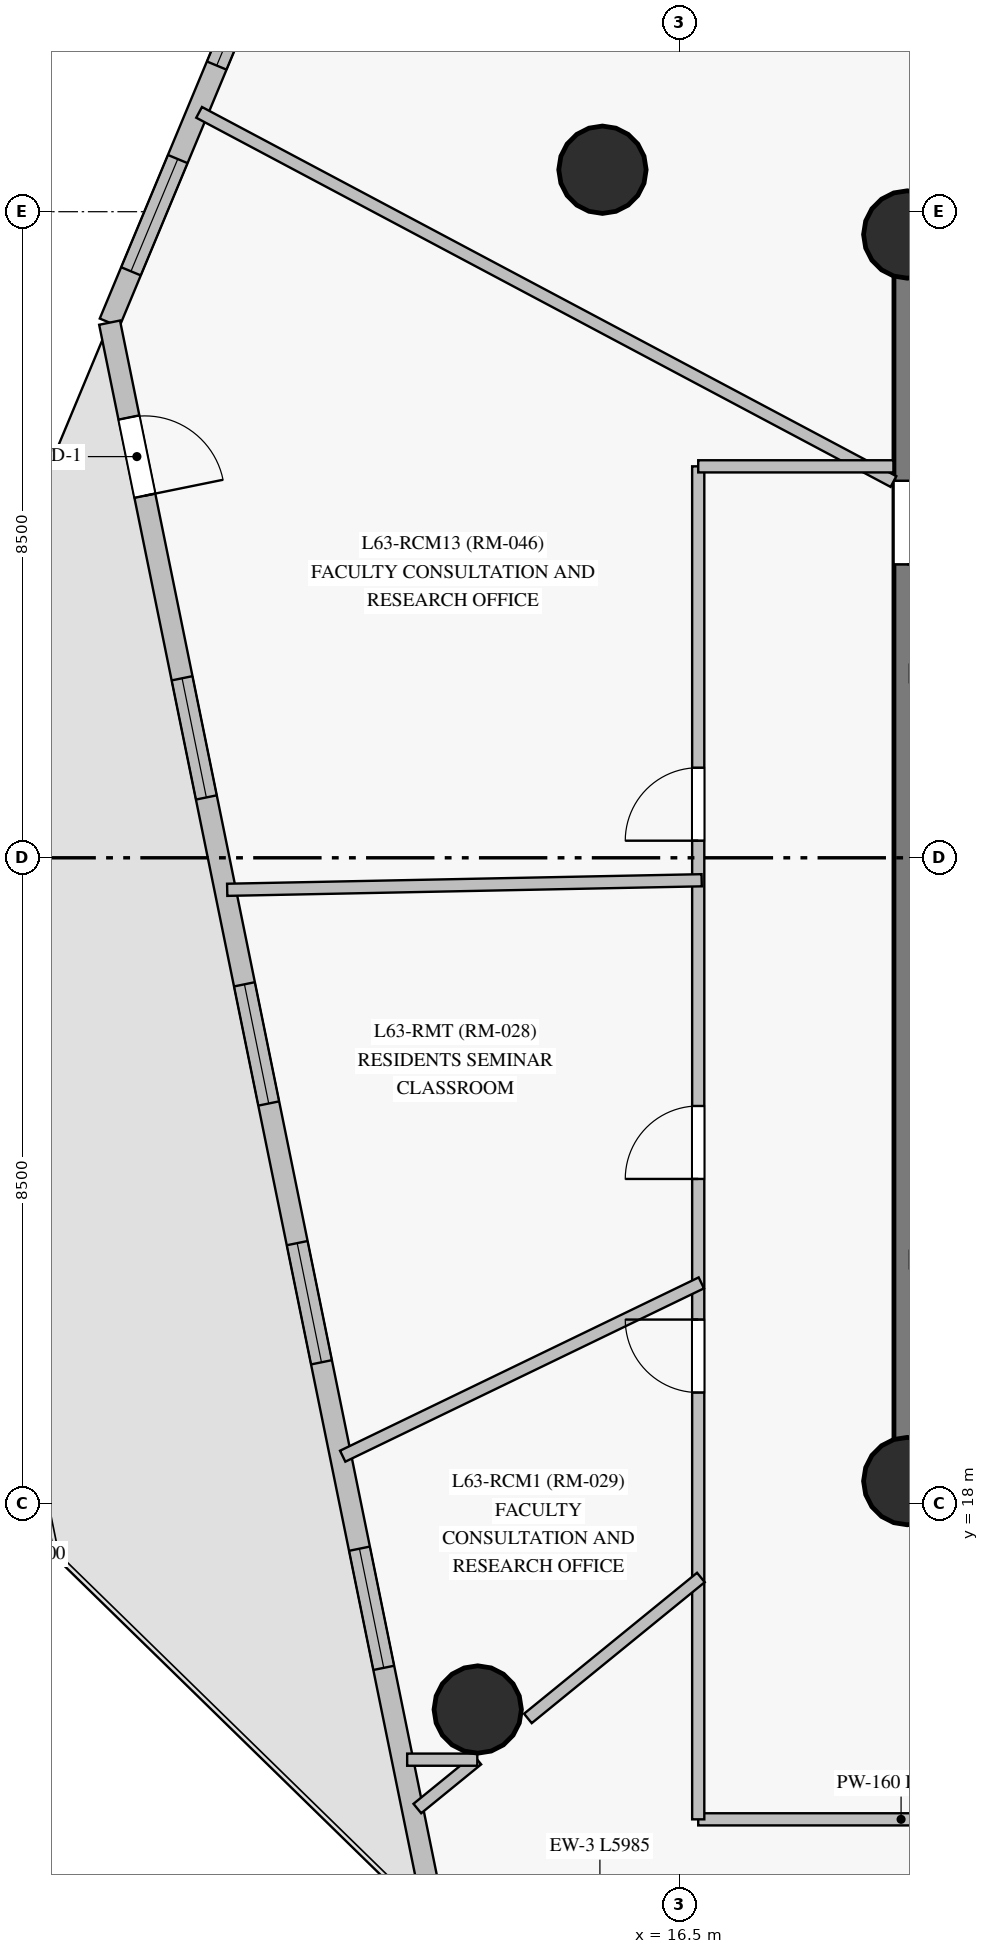
"""IFC4 building model, lengths in metres.
Left out: names, types, materials, properties, quantities, classifications, styles, units other than length and angle.
Written with IfcOpenShell. Run it as: python <this file> out.ifc"""

import sys

from ifc_helpers import new_model, si_unit, direction, frame, frame_2d, origin, origin_with_axes, origin_2d, place, context, subcontext, project, spatial, rectangle, circle, extrude, source, transform, mapped, element, fill, save


model = new_model("IFC4")
c1 = context("Model", 3, precision=1e-05, world=origin(), true_north=direction((0.0, 1.0)))
c2 = subcontext(c1, "Body", "Model", "MODEL_VIEW")
j1 = project(units=[si_unit("LENGTHUNIT", "METRE"), si_unit("PLANEANGLEUNIT", "RADIAN")], contexts=[c1])
p1 = place(None, origin())
s1 = spatial("IfcSite", under=j1, at=p1, CompositionType="ELEMENT")
p2 = place(p1, origin())
s2 = spatial("IfcBuilding", under=s1, at=p2, CompositionType="ELEMENT")
p3 = place(p2, frame((0.0, 0.0, 216.9)))
s3 = spatial("IfcBuildingStorey", under=s2, at=p3, CompositionType="ELEMENT", Elevation=216.9)
p4 = place(p3, frame((19.5, 18.3, 0.0), z_axis=(0.0, 0.0, 1.0), x_axis=(1.0, 0.0, 0.0)))
e1 = element("IfcWall", 1, at=p4, inside=s3, PredefinedType="SHEAR", context=c2, shape_type="SweptSolid", body=[
    extrude(rectangle(XDim=7.05, YDim=0.35, at=frame_2d((3.525, 0.0))), origin(), (0.0, 0.0, 1.0), 2.85),
])
p5 = place(p4, frame((4.2, 0.0, 0.0)))
e2 = element("IfcOpeningElement", 2, at=p5, cuts=e1, PredefinedType="OPENING", context=c2, shape_type="SweptSolid", body=[
    extrude(rectangle(XDim=1.4, YDim=2.2, at=frame_2d((0.7, 1.1))), frame((0.0, 0.185, 0.0), z_axis=(0.0, -1.0, 0.0), x_axis=(1.0, 0.0, 0.0)), (0.0, 0.0, 1.0), 0.37),
])
p6 = place(p3, frame((26.55, 34.7, 0.0), z_axis=(0.0, 0.0, 1.0), x_axis=(-1.0, 0.0, 0.0)))
e3 = element("IfcWall", 3, at=p6, inside=s3, PredefinedType="SHEAR", context=c2, shape_type="SweptSolid", body=[
    extrude(rectangle(XDim=7.05, YDim=0.35, at=frame_2d((3.525, 0.0))), origin(), (0.0, 0.0, 1.0), 2.85),
])
p7 = place(p3, frame((19.5, 34.7, 0.0), z_axis=(0.0, 0.0, 1.0), x_axis=(0.0, -1.0, 0.0)))
e4 = element("IfcWall", 4, at=p7, inside=s3, PredefinedType="SHEAR", context=c2, shape_type="SweptSolid", body=[
    extrude(rectangle(XDim=16.4, YDim=0.35, at=frame_2d((8.2, 0.0))), origin(), (0.0, 0.0, 1.0), 2.85),
])
p8 = place(p7, frame((3.24, 0.0, 0.0)))
e5 = element("IfcOpeningElement", 5, at=p8, cuts=e4, PredefinedType="OPENING", context=c2, shape_type="SweptSolid", body=[
    extrude(rectangle(XDim=1.1, YDim=2.15, at=frame_2d((0.55, 1.075))), frame((0.0, 0.185, 0.0), z_axis=(0.0, -1.0, 0.0), x_axis=(1.0, 0.0, 0.0)), (0.0, 0.0, 1.0), 0.37),
])
m1 = source(origin_with_axes(), c2, "Body", "SweptSolid", [
    extrude(circle(Radius=0.575, at=origin_2d()), origin(), (0.0, 0.0, 1.0), 3.05),
])
for number, where, z_axis, x_axis in (
    (6, (19.5, 18.3, 0.0), (0.0, 0.0, 1.0), (1.0, 0.0, 0.0)),
    (7, (19.5, 34.7, 0.0), (0.0, 0.0, 1.0), (1.0, 0.0, 0.0)),
    (8, (15.49, 35.552, 0.0), (0.0, 0.0, 1.0), (1.0, 0.0, 0.0)),
    (9, (13.849, 15.295, 0.0), (0.0, 0.0, 1.0), (1.0, 0.0, 0.0)),
):
    element("IfcColumn", number, at=place(p3, frame(where, z_axis=z_axis, x_axis=x_axis)), inside=s3, PredefinedType="COLUMN", context=c2, shape_type="MappedRepresentation", body=[
        mapped(m1, transform((0.0, 0.0, 0.0), scale=1.0)),
    ])
p9 = place(p3, frame((11.308, 39.065, 0.0), z_axis=(0.0, 0.0, 1.0), x_axis=(-0.384644347337, -0.923064854743, 0.0)))
e10 = element("IfcWall", 10, at=p9, inside=s3, PredefinedType="SOLIDWALL", context=c2, shape_type="SweptSolid", body=[
    extrude(rectangle(XDim=5.985, YDim=0.28, at=frame_2d((2.993, 0.0))), origin(), (0.0, 0.0, 1.0), 2.85),
])
p10 = place(p9, frame((0.721, 0.0, 0.85)))
e11 = element("IfcOpeningElement", 11, at=p10, cuts=e10, PredefinedType="OPENING", context=c2, shape_type="SweptSolid", body=[
    extrude(rectangle(XDim=1.6, YDim=1.6, at=frame_2d((0.8, 0.8))), frame((0.0, 0.15, 0.0), z_axis=(0.0, -1.0, 0.0), x_axis=(1.0, 0.0, 0.0)), (0.0, 0.0, 1.0), 0.3),
])
p11 = place(p9, frame((3.654, 0.0, 0.85)))
e12 = element("IfcOpeningElement", 12, at=p11, cuts=e10, PredefinedType="OPENING", context=c2, shape_type="SweptSolid", body=[
    extrude(rectangle(XDim=1.6, YDim=1.6, at=frame_2d((0.8, 0.8))), frame((0.0, 0.15, 0.0), z_axis=(0.0, -1.0, 0.0), x_axis=(1.0, 0.0, 0.0)), (0.0, 0.0, 1.0), 0.3),
])
p12 = place(p3, frame((9.006, 33.54, 0.0), z_axis=(0.0, 0.0, 1.0), x_axis=(0.19971489877, -0.979854049953, 0.0)))
e13 = element("IfcWall", 13, at=p12, inside=s3, PredefinedType="SOLIDWALL", context=c2, shape_type="SweptSolid", body=[
    extrude(rectangle(XDim=21.583, YDim=0.28, at=frame_2d((10.792, 0.0))), origin(), (0.0, 0.0, 1.0), 2.85),
])
p13 = place(p12, frame((4.775, 0.0, 0.85)))
e14 = element("IfcOpeningElement", 14, at=p13, cuts=e13, PredefinedType="OPENING", context=c2, shape_type="SweptSolid", body=[
    extrude(rectangle(XDim=1.6, YDim=1.6, at=frame_2d((0.8, 0.8))), frame((0.0, 0.15, 0.0), z_axis=(0.0, -1.0, 0.0), x_axis=(1.0, 0.0, 0.0)), (0.0, 0.0, 1.0), 0.3),
])
p14 = place(p12, frame((8.884, 0.0, 0.85)))
e15 = element("IfcOpeningElement", 15, at=p14, cuts=e13, PredefinedType="OPENING", context=c2, shape_type="SweptSolid", body=[
    extrude(rectangle(XDim=1.6, YDim=1.6, at=frame_2d((0.8, 0.8))), frame((0.0, 0.15, 0.0), z_axis=(0.0, -1.0, 0.0), x_axis=(1.0, 0.0, 0.0)), (0.0, 0.0, 1.0), 0.3),
])
p15 = place(p12, frame((12.359, 0.0, 0.85)))
e16 = element("IfcOpeningElement", 16, at=p15, cuts=e13, PredefinedType="OPENING", context=c2, shape_type="SweptSolid", body=[
    extrude(rectangle(XDim=1.6, YDim=1.6, at=frame_2d((0.8, 0.8))), frame((0.0, 0.15, 0.0), z_axis=(0.0, -1.0, 0.0), x_axis=(1.0, 0.0, 0.0)), (0.0, 0.0, 1.0), 0.3),
])
p16 = place(p12, frame((16.461, 0.0, 0.85)))
e17 = element("IfcOpeningElement", 17, at=p16, cuts=e13, PredefinedType="OPENING", context=c2, shape_type="SweptSolid", body=[
    extrude(rectangle(XDim=1.6, YDim=1.6, at=frame_2d((0.8, 0.8))), frame((0.0, 0.15, 0.0), z_axis=(0.0, -1.0, 0.0), x_axis=(1.0, 0.0, 0.0)), (0.0, 0.0, 1.0), 0.3),
])
p17 = place(p12, frame((1.274, 0.0, 0.0)))
e18 = element("IfcOpeningElement", 18, at=p17, cuts=e13, PredefinedType="OPENING", context=c2, shape_type="SweptSolid", body=[
    extrude(rectangle(XDim=1.05, YDim=2.12, at=frame_2d((0.525, 1.06))), frame((0.0, 0.15, 0.0), z_axis=(0.0, -1.0, 0.0), x_axis=(1.0, 0.0, 0.0)), (0.0, 0.0, 1.0), 0.3),
])
p18 = place(p3, frame((41.8, 13.85, 0.0), z_axis=(0.0, 0.0, 1.0), x_axis=(-1.0, 0.0, 0.0)))
e19 = element("IfcWall", 19, at=p18, inside=s3, PredefinedType="PARTITIONING", context=c2, shape_type="SweptSolid", body=[
    extrude(rectangle(XDim=25.05, YDim=0.16, at=frame_2d((12.525, 0.0))), origin(), (0.0, 0.0, 1.0), 2.3),
])
p19 = place(p18, frame((10.634, 0.0, 0.0)))
e20 = element("IfcOpeningElement", 20, at=p19, cuts=e19, PredefinedType="OPENING", context=c2, shape_type="SweptSolid", body=[
    extrude(rectangle(XDim=0.96, YDim=2.15, at=frame_2d((0.48, 1.075))), frame((0.0, 0.09, 0.0), z_axis=(0.0, -1.0, 0.0), x_axis=(1.0, 0.0, 0.0)), (0.0, 0.0, 1.0), 0.18),
])
p20 = place(p18, frame((6.48, 0.0, 0.0)))
e21 = element("IfcOpeningElement", 21, at=p20, cuts=e19, PredefinedType="OPENING", context=c2, shape_type="SweptSolid", body=[
    extrude(rectangle(XDim=0.96, YDim=2.15, at=frame_2d((0.48, 1.075))), frame((0.0, 0.09, 0.0), z_axis=(0.0, -1.0, 0.0), x_axis=(1.0, 0.0, 0.0)), (0.0, 0.0, 1.0), 0.18),
])
p21 = place(p18, frame((18.752, 0.0, 0.0)))
e22 = element("IfcOpeningElement", 22, at=p21, cuts=e19, PredefinedType="OPENING", context=c2, shape_type="SweptSolid", body=[
    extrude(rectangle(XDim=0.96, YDim=2.15, at=frame_2d((0.48, 1.075))), frame((0.0, 0.09, 0.0), z_axis=(0.0, -1.0, 0.0), x_axis=(1.0, 0.0, 0.0)), (0.0, 0.0, 1.0), 0.18),
])
p22 = place(p18, frame((15.808, 0.0, 0.0)))
e23 = element("IfcOpeningElement", 23, at=p22, cuts=e19, PredefinedType="OPENING", context=c2, shape_type="SweptSolid", body=[
    extrude(rectangle(XDim=0.96, YDim=2.15, at=frame_2d((0.48, 1.075))), frame((0.0, 0.09, 0.0), z_axis=(0.0, -1.0, 0.0), x_axis=(1.0, 0.0, 0.0)), (0.0, 0.0, 1.0), 0.18),
])
p23 = place(p18, frame((13.594, 0.0, 0.0)))
e24 = element("IfcOpeningElement", 24, at=p23, cuts=e19, PredefinedType="OPENING", context=c2, shape_type="SweptSolid", body=[
    extrude(rectangle(XDim=0.96, YDim=2.15, at=frame_2d((0.48, 1.075))), frame((0.0, 0.09, 0.0), z_axis=(0.0, -1.0, 0.0), x_axis=(1.0, 0.0, 0.0)), (0.0, 0.0, 1.0), 0.18),
])
p24 = place(p18, frame((1.822, 0.0, 0.0)))
e25 = element("IfcOpeningElement", 25, at=p24, cuts=e19, PredefinedType="OPENING", context=c2, shape_type="SweptSolid", body=[
    extrude(rectangle(XDim=0.96, YDim=2.15, at=frame_2d((0.48, 1.075))), frame((0.0, 0.09, 0.0), z_axis=(0.0, -1.0, 0.0), x_axis=(1.0, 0.0, 0.0)), (0.0, 0.0, 1.0), 0.18),
])
p25 = place(p3, frame((16.75, 13.85, 0.0), z_axis=(0.0, 0.0, 1.0), x_axis=(0.0, 1.0, 0.0)))
e26 = element("IfcWall", 26, at=p25, inside=s3, PredefinedType="PARTITIONING", context=c2, shape_type="SweptSolid", body=[
    extrude(rectangle(XDim=17.8, YDim=0.16, at=frame_2d((8.9, 0.0))), origin(), (0.0, 0.0, 1.0), 2.45),
])
p26 = place(p25, frame((8.425, 0.0, 0.0)))
e27 = element("IfcOpeningElement", 27, at=p26, cuts=e26, PredefinedType="OPENING", context=c2, shape_type="SweptSolid", body=[
    extrude(rectangle(XDim=0.96, YDim=2.15, at=frame_2d((0.48, 1.075))), frame((0.0, 0.09, 0.0), z_axis=(0.0, -1.0, 0.0), x_axis=(1.0, 0.0, 0.0)), (0.0, 0.0, 1.0), 0.18),
])
p27 = place(p25, frame((5.615, 0.0, 0.0)))
e28 = element("IfcOpeningElement", 28, at=p27, cuts=e26, PredefinedType="OPENING", context=c2, shape_type="SweptSolid", body=[
    extrude(rectangle(XDim=0.96, YDim=2.15, at=frame_2d((0.48, 1.075))), frame((0.0, 0.09, 0.0), z_axis=(0.0, -1.0, 0.0), x_axis=(1.0, 0.0, 0.0)), (0.0, 0.0, 1.0), 0.18),
])
p28 = place(p25, frame((12.875, 0.0, 0.0)))
e29 = element("IfcOpeningElement", 29, at=p28, cuts=e26, PredefinedType="OPENING", context=c2, shape_type="SweptSolid", body=[
    extrude(rectangle(XDim=0.96, YDim=2.15, at=frame_2d((0.48, 1.075))), frame((0.0, 0.09, 0.0), z_axis=(0.0, -1.0, 0.0), x_axis=(1.0, 0.0, 0.0)), (0.0, 0.0, 1.0), 0.18),
])
p29 = place(p3, frame((19.319, 31.45, 0.0), z_axis=(0.0, 0.0, 1.0), x_axis=(-0.882947317061, 0.469472081485, 0.0)))
e30 = element("IfcWall", 30, at=p29, inside=s3, PredefinedType="PARTITIONING", context=c2, shape_type="SweptSolid", body=[
    extrude(rectangle(XDim=10.346, YDim=0.16, at=frame_2d((5.173, 0.0))), origin(), (0.0, 0.0, 1.0), 2.85),
])
p30 = place(p3, frame((10.553, 26.079, 0.0), z_axis=(0.0, 0.0, 1.0), x_axis=(0.999797204263, 0.020138280671, 0.0)))
e31 = element("IfcWall", 31, at=p30, inside=s3, PredefinedType="PARTITIONING", context=c2, shape_type="SweptSolid", body=[
    extrude(rectangle(XDim=6.243, YDim=0.16, at=frame_2d((3.122, 0.0))), origin(), (0.0, 0.0, 1.0), 2.85),
])
p31 = place(p3, frame((16.791, 20.908, 0.0), z_axis=(0.0, 0.0, 1.0), x_axis=(-0.900356558633, -0.435152924069, 0.0)))
e32 = element("IfcWall", 32, at=p31, inside=s3, PredefinedType="PARTITIONING", context=c2, shape_type="SweptSolid", body=[
    extrude(rectangle(XDim=5.24, YDim=0.16, at=frame_2d((2.62, 0.0))), origin(), (0.0, 0.0, 1.0), 2.85),
])
p32 = place(p3, frame((16.785, 17.032, 0.0), z_axis=(0.0, 0.0, 1.0), x_axis=(-0.775222919208, -0.631687759526, 0.0)))
e33 = element("IfcWall", 33, at=p32, inside=s3, PredefinedType="PARTITIONING", context=c2, shape_type="SweptSolid", body=[
    extrude(rectangle(XDim=2.936, YDim=0.16, at=frame_2d((1.468, 0.0))), origin(), (0.0, 0.0, 1.0), 2.35),
])
p33 = place(p3, frame((16.75, 31.65, 0.0), z_axis=(0.0, 0.0, 1.0), x_axis=(1.0, 0.0, 0.0)))
e34 = element("IfcWall", 34, at=p33, inside=s3, PredefinedType="PARTITIONING", context=c2, shape_type="SweptSolid", body=[
    extrude(rectangle(XDim=2.568, YDim=0.16, at=frame_2d((1.284, 0.0))), origin(), (0.0, 0.0, 1.0), 2.85),
])
p34 = place(p3, frame((13.844, 14.635, 0.0), z_axis=(0.0, 0.0, 1.0), x_axis=(-0.775195820766, -0.631721013951, 0.0)))
e35 = element("IfcWall", 35, at=p34, inside=s3, PredefinedType="PARTITIONING", context=c2, shape_type="SweptSolid", body=[
    extrude(rectangle(XDim=1.018, YDim=0.16, at=frame_2d((0.509, 0.0))), origin(), (0.0, 0.0, 1.0), 2.85),
])
p35 = place(p3, frame((12.921, 14.635, 0.0), z_axis=(0.0, 0.0, 1.0), x_axis=(1.0, 0.0, 0.0)))
e36 = element("IfcWall", 36, at=p35, inside=s3, PredefinedType="PARTITIONING", context=c2, shape_type="SweptSolid", body=[
    extrude(rectangle(XDim=0.923, YDim=0.16, at=frame_2d((0.461, 0.0))), origin(), (0.0, 0.0, 1.0), 2.3),
])
m2 = source(origin_with_axes(), c2, "Body", "SweptSolid", [
    extrude(rectangle(XDim=1.6, YDim=1.6, at=frame_2d((0.8, 0.8))), frame((0.0, 0.03, 0.0), z_axis=(0.0, -1.0, 0.0), x_axis=(1.0, 0.0, 0.0)), (0.0, 0.0, 1.0), 0.06),
])
p36 = place(p10, origin())
e37 = element("IfcWindow", 37, at=p36, inside=s3, PartitioningType="SINGLE_PANEL", PredefinedType="WINDOW", context=c2, shape_type="MappedRepresentation", body=[
    mapped(m2, transform((0.0, 0.0, 0.0), scale=1.0)),
])
fill(e11, e37)
p37 = place(p11, origin())
e38 = element("IfcWindow", 38, at=p37, inside=s3, PartitioningType="SINGLE_PANEL", PredefinedType="WINDOW", context=c2, shape_type="MappedRepresentation", body=[
    mapped(m2, transform((0.0, 0.0, 0.0), scale=1.0)),
])
fill(e12, e38)
p38 = place(p13, origin())
e39 = element("IfcWindow", 39, at=p38, inside=s3, PartitioningType="SINGLE_PANEL", PredefinedType="WINDOW", context=c2, shape_type="MappedRepresentation", body=[
    mapped(m2, transform((0.0, 0.0, 0.0), scale=1.0)),
])
fill(e14, e39)
p39 = place(p14, origin())
e40 = element("IfcWindow", 40, at=p39, inside=s3, PartitioningType="SINGLE_PANEL", PredefinedType="WINDOW", context=c2, shape_type="MappedRepresentation", body=[
    mapped(m2, transform((0.0, 0.0, 0.0), scale=1.0)),
])
fill(e15, e40)
p40 = place(p15, origin())
e41 = element("IfcWindow", 41, at=p40, inside=s3, PartitioningType="SINGLE_PANEL", PredefinedType="WINDOW", context=c2, shape_type="MappedRepresentation", body=[
    mapped(m2, transform((0.0, 0.0, 0.0), scale=1.0)),
])
fill(e16, e41)
p41 = place(p16, origin())
e42 = element("IfcWindow", 42, at=p41, inside=s3, PartitioningType="SINGLE_PANEL", PredefinedType="WINDOW", context=c2, shape_type="MappedRepresentation", body=[
    mapped(m2, transform((0.0, 0.0, 0.0), scale=1.0)),
])
fill(e17, e42)
m3 = source(origin_with_axes(), c2, "Body", "SweptSolid", [
    extrude(rectangle(XDim=1.05, YDim=2.12, at=frame_2d((0.525, 1.06))), frame((0.0, 0.025, 0.0), z_axis=(0.0, -1.0, 0.0), x_axis=(1.0, 0.0, 0.0)), (0.0, 0.0, 1.0), 0.05),
])
p42 = place(p17, origin())
e43 = element("IfcDoor", 43, at=p42, inside=s3, OperationType="SINGLE_SWING_RIGHT", PredefinedType="DOOR", context=c2, shape_type="MappedRepresentation", body=[
    mapped(m3, transform((0.0, 0.0, 0.0), scale=1.0)),
])
fill(e18, e43)
m4 = source(origin_with_axes(), c2, "Body", "SweptSolid", [
    extrude(rectangle(XDim=1.1, YDim=2.15, at=frame_2d((0.55, 1.075))), frame((0.0, 0.025, 0.0), z_axis=(0.0, -1.0, 0.0), x_axis=(1.0, 0.0, 0.0)), (0.0, 0.0, 1.0), 0.05),
])
p43 = place(p8, origin())
e44 = element("IfcDoor", 44, at=p43, inside=s3, OperationType="SINGLE_SWING_RIGHT", PredefinedType="DOOR", context=c2, shape_type="MappedRepresentation", body=[
    mapped(m4, transform((0.0, 0.0, 0.0), scale=1.0)),
])
fill(e5, e44)
m5 = source(origin_with_axes(), c2, "Body", "SweptSolid", [
    extrude(rectangle(XDim=0.96, YDim=2.15, at=frame_2d((0.48, 1.075))), frame((0.0, 0.025, 0.0), z_axis=(0.0, -1.0, 0.0), x_axis=(1.0, 0.0, 0.0)), (0.0, 0.0, 1.0), 0.05),
])
p44 = place(p26, origin())
e45 = element("IfcDoor", 45, at=p44, inside=s3, OperationType="SINGLE_SWING_LEFT", PredefinedType="DOOR", context=c2, shape_type="MappedRepresentation", body=[
    mapped(m5, transform((0.0, 0.0, 0.0), scale=1.0)),
])
fill(e27, e45)
p45 = place(p27, origin())
e46 = element("IfcDoor", 46, at=p45, inside=s3, OperationType="SINGLE_SWING_RIGHT", PredefinedType="DOOR", context=c2, shape_type="MappedRepresentation", body=[
    mapped(m5, transform((0.0, 0.0, 0.0), scale=1.0)),
])
fill(e28, e46)
p46 = place(p28, origin())
e47 = element("IfcDoor", 47, at=p46, inside=s3, OperationType="SINGLE_SWING_LEFT", PredefinedType="DOOR", context=c2, shape_type="MappedRepresentation", body=[
    mapped(m5, transform((0.0, 0.0, 0.0), scale=1.0)),
])
fill(e29, e47)
save(model, sys.argv[1])
